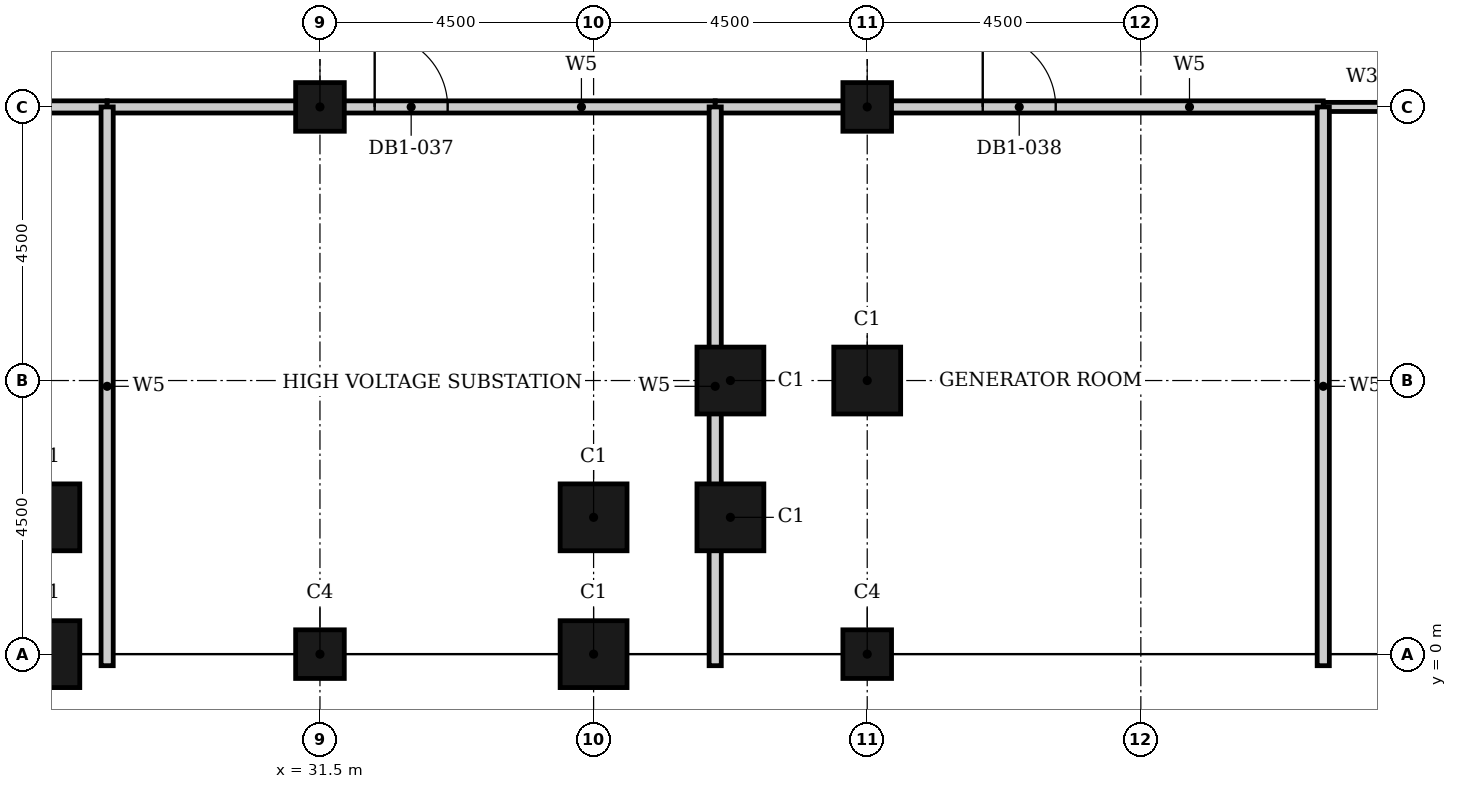
"""IFC4 building model, lengths in metres.
Left out: names, types, materials, properties, quantities, classifications, styles, units other than length and angle.
Written with IfcOpenShell. Run it as: python <this file> out.ifc"""

import sys

from ifc_helpers import new_model, si_unit, direction, frame, frame_2d, origin, origin_2d, place, context, subcontext, project, spatial, rectangle, hollow_rectangle, extrude, element, fill, save


model = new_model("IFC4")
c1 = context("Model", 3, precision=1e-05, world=origin(), true_north=direction((0.0, 1.0)))
c2 = subcontext(c1, "Body", "Model", "MODEL_VIEW")
j1 = project(units=[si_unit("LENGTHUNIT", "METRE"), si_unit("PLANEANGLEUNIT", "RADIAN")], contexts=[c1])
p1 = place(None, origin())
s1 = spatial("IfcSite", under=j1, at=p1, CompositionType="ELEMENT")
p2 = place(p1, origin())
s2 = spatial("IfcBuilding", under=s1, at=p2, CompositionType="ELEMENT")
p3 = place(p2, frame((0.0, 0.0, -6.0)))
s3 = spatial("IfcBuildingStorey", under=s2, at=p3, CompositionType="ELEMENT", Elevation=-6.0)
for number, where, z_axis, x_axis in (
    (1, (27.0, 2.25, -0.5), (0.0, 0.0, 1.0), (1.0, 0.0, 0.0)),
    (2, (27.0, 0.0, -0.5), (0.0, 0.0, 1.0), (1.0, 0.0, 0.0)),
    (3, (36.0, 0.0, -0.5), (0.0, 0.0, 1.0), (1.0, 0.0, 0.0)),
    (4, (36.0, 2.25, -0.5), (0.0, 0.0, 1.0), (1.0, 0.0, 0.0)),
    (5, (38.25, 2.25, -0.5), (0.0, 0.0, 1.0), (1.0, 0.0, 0.0)),
    (6, (38.25, 4.5, -0.5), (0.0, 0.0, 1.0), (1.0, 0.0, 0.0)),
    (7, (40.5, 4.5, -0.5), (0.0, 0.0, 1.0), (1.0, 0.0, 0.0)),
):
    element("IfcColumn", number, at=place(p3, frame(where, z_axis=z_axis, x_axis=x_axis)), inside=s3, PredefinedType="COLUMN", context=c2, shape_type="SweptSolid", body=[
        extrude(hollow_rectangle(XDim=1.1, YDim=1.1, WallThickness=0.036, at=origin_2d()), origin(), (0.0, 0.0, 1.0), 6.5),
    ])
for number, where, z_axis, x_axis in (
    (8, (31.5, 0.0, -0.5), (0.0, 0.0, 1.0), (1.0, 0.0, 0.0)),
    (9, (40.5, 0.0, -0.5), (0.0, 0.0, 1.0), (1.0, 0.0, 0.0)),
    (10, (31.5, 9.0, -0.5), (0.0, 0.0, 1.0), (1.0, 0.0, 0.0)),
    (11, (40.5, 9.0, -0.5), (0.0, 0.0, 1.0), (1.0, 0.0, 0.0)),
):
    element("IfcColumn", number, at=place(p3, frame(where, z_axis=z_axis, x_axis=x_axis)), inside=s3, PredefinedType="COLUMN", context=c2, shape_type="SweptSolid", body=[
        extrude(hollow_rectangle(XDim=0.8, YDim=0.8, WallThickness=0.025, at=origin_2d()), origin(), (0.0, 0.0, 1.0), 6.5),
    ])
p4 = place(p3, frame((48.0, 9.0, 0.0), z_axis=(0.0, 0.0, 1.0), x_axis=(1.0, 0.0, 0.0)))
e12 = element("IfcWall", 12, at=p4, inside=s3, PredefinedType="PARTITIONING", context=c2, shape_type="SweptSolid", body=[
    extrude(rectangle(XDim=4.6, YDim=0.15, at=frame_2d((2.3, 0.0))), origin(), (0.0, 0.0, 1.0), 5.6),
])
p5 = place(p4, frame((2.25, 0.0, 0.0)))
e13 = element("IfcOpeningElement", 13, at=p5, cuts=e12, PredefinedType="OPENING", context=c2, shape_type="SweptSolid", body=[
    extrude(rectangle(XDim=1.0, YDim=2.1, at=frame_2d((0.5, 1.05))), frame((0.0, 0.085, 0.0), z_axis=(0.0, -1.0, 0.0), x_axis=(1.0, 0.0, 0.0)), (0.0, 0.0, 1.0), 0.17),
])
p6 = place(p3, frame((21.25, 9.0, 0.0), z_axis=(0.0, 0.0, 1.0), x_axis=(1.0, 0.0, 0.0)))
e14 = element("IfcWall", 14, at=p6, inside=s3, PredefinedType="PARTITIONING", context=c2, shape_type="SweptSolid", body=[
    extrude(rectangle(XDim=6.75, YDim=0.2, at=frame_2d((3.375, 0.0))), origin(), (0.0, 0.0, 1.0), 5.6),
])
p7 = place(p6, frame((2.775, 0.0, 0.0)))
e15 = element("IfcOpeningElement", 15, at=p7, cuts=e14, PredefinedType="OPENING", context=c2, shape_type="SweptSolid", body=[
    extrude(rectangle(XDim=1.2, YDim=2.1, at=frame_2d((0.6, 1.05))), frame((0.0, 0.11, 0.0), z_axis=(0.0, -1.0, 0.0), x_axis=(1.0, 0.0, 0.0)), (0.0, 0.0, 1.0), 0.22),
])
p8 = place(p3, frame((28.0, 9.0, 0.0), z_axis=(0.0, 0.0, 1.0), x_axis=(1.0, 0.0, 0.0)))
e16 = element("IfcWall", 16, at=p8, inside=s3, PredefinedType="PARTITIONING", context=c2, shape_type="SweptSolid", body=[
    extrude(rectangle(XDim=10.0, YDim=0.2, at=frame_2d((5.0, 0.0))), origin(), (0.0, 0.0, 1.0), 5.6),
])
p9 = place(p8, frame((4.4, 0.0, 0.0)))
e17 = element("IfcOpeningElement", 17, at=p9, cuts=e16, PredefinedType="OPENING", context=c2, shape_type="SweptSolid", body=[
    extrude(rectangle(XDim=1.2, YDim=2.1, at=frame_2d((0.6, 1.05))), frame((0.0, 0.11, 0.0), z_axis=(0.0, -1.0, 0.0), x_axis=(1.0, 0.0, 0.0)), (0.0, 0.0, 1.0), 0.22),
])
p10 = place(p3, frame((38.0, 9.0, 0.0), z_axis=(0.0, 0.0, 1.0), x_axis=(1.0, 0.0, 0.0)))
e18 = element("IfcWall", 18, at=p10, inside=s3, PredefinedType="PARTITIONING", context=c2, shape_type="SweptSolid", body=[
    extrude(rectangle(XDim=10.0, YDim=0.2, at=frame_2d((5.0, 0.0))), origin(), (0.0, 0.0, 1.0), 5.6),
])
p11 = place(p10, frame((4.4, 0.0, 0.0)))
e19 = element("IfcOpeningElement", 19, at=p11, cuts=e18, PredefinedType="OPENING", context=c2, shape_type="SweptSolid", body=[
    extrude(rectangle(XDim=1.2, YDim=2.1, at=frame_2d((0.6, 1.05))), frame((0.0, 0.11, 0.0), z_axis=(0.0, -1.0, 0.0), x_axis=(1.0, 0.0, 0.0)), (0.0, 0.0, 1.0), 0.22),
])
for number, where, z_axis, x_axis in (
    (20, (28.0, -0.19, 0.0), (0.0, 0.0, 1.0), (0.0, 1.0, 0.0)),
    (21, (38.0, -0.19, 0.0), (0.0, 0.0, 1.0), (0.0, 1.0, 0.0)),
    (22, (48.0, -0.19, 0.0), (0.0, 0.0, 1.0), (0.0, 1.0, 0.0)),
):
    element("IfcWall", number, at=place(p3, frame(where, z_axis=z_axis, x_axis=x_axis)), inside=s3, PredefinedType="PARTITIONING", context=c2, shape_type="SweptSolid", body=[
        extrude(rectangle(XDim=9.19, YDim=0.2, at=frame_2d((4.595, 0.0))), origin(), (0.0, 0.0, 1.0), 5.6),
    ])
p12 = place(p9, origin())
e23 = element("IfcDoor", 23, at=p12, inside=s3, OperationType="SINGLE_SWING_LEFT", PredefinedType="DOOR", context=c2, shape_type="SweptSolid", body=[
    extrude(rectangle(XDim=1.2, YDim=2.1, at=frame_2d((0.6, 1.05))), frame((0.0, 0.025, 0.0), z_axis=(0.0, -1.0, 0.0), x_axis=(1.0, 0.0, 0.0)), (0.0, 0.0, 1.0), 0.05),
])
fill(e17, e23)
p13 = place(p11, origin())
e24 = element("IfcDoor", 24, at=p13, inside=s3, OperationType="SINGLE_SWING_LEFT", PredefinedType="DOOR", context=c2, shape_type="SweptSolid", body=[
    extrude(rectangle(XDim=1.2, YDim=2.1, at=frame_2d((0.6, 1.05))), frame((0.0, 0.025, 0.0), z_axis=(0.0, -1.0, 0.0), x_axis=(1.0, 0.0, 0.0)), (0.0, 0.0, 1.0), 0.05),
])
fill(e19, e24)
save(model, sys.argv[1])
